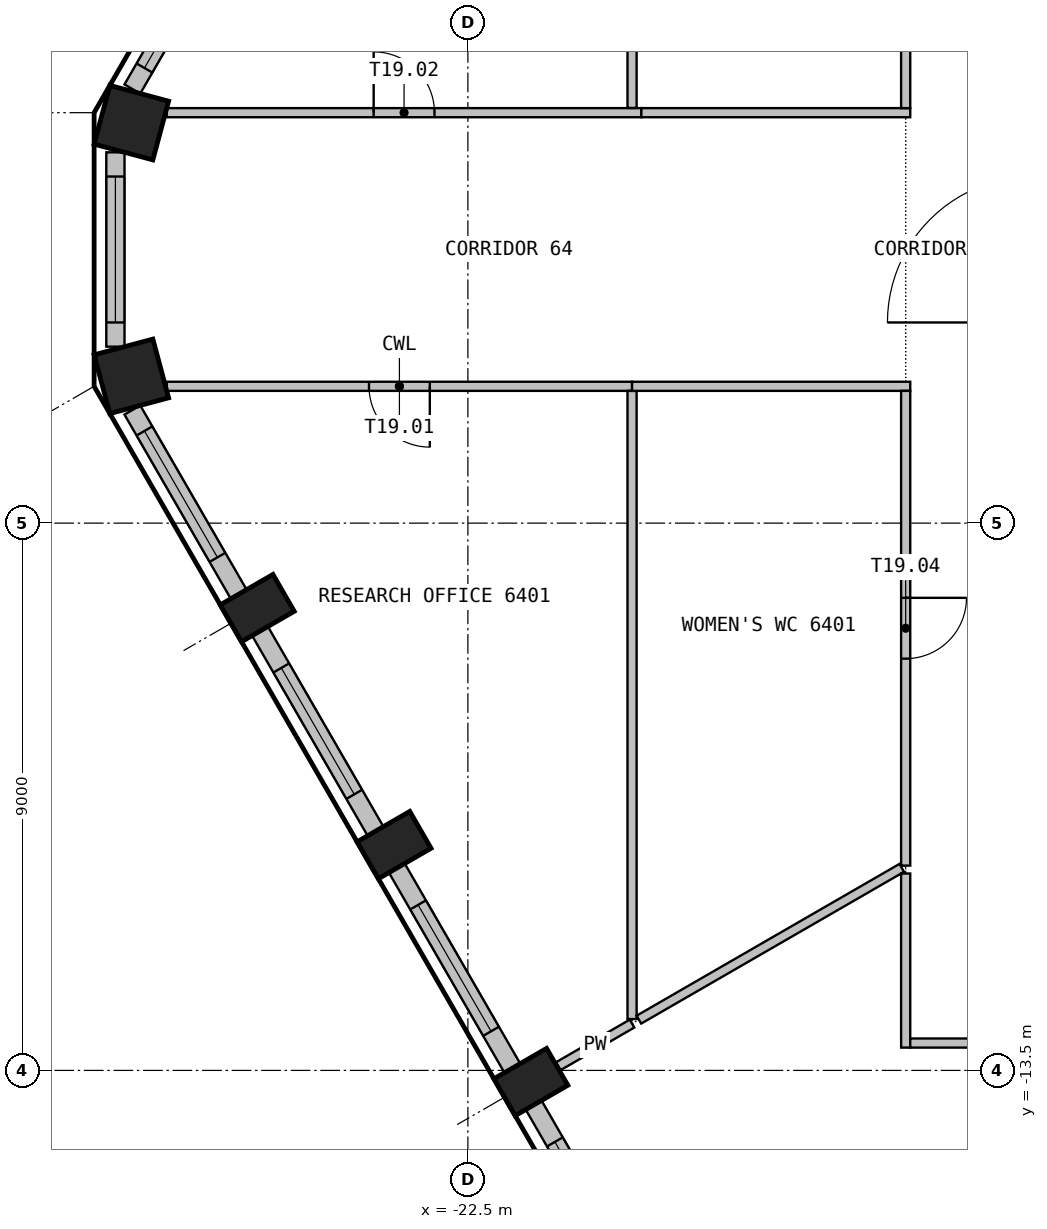
"""IFC4 building model, lengths in metres.
Left out: names, types, materials, properties, quantities, classifications, styles, units other than length and angle.
Written with IfcOpenShell. Run it as: python <this file> out.ifc"""

import sys

from ifc_helpers import new_model, si_unit, direction, frame, frame_2d, origin, origin_2d, place, context, subcontext, project, spatial, rectangle, extrude, element, fill, save


model = new_model("IFC4")
c1 = context("Model", 3, precision=1e-05, world=origin(), true_north=direction((0.0, 1.0)))
c2 = subcontext(c1, "Body", "Model", "MODEL_VIEW")
j1 = project(units=[si_unit("LENGTHUNIT", "METRE"), si_unit("PLANEANGLEUNIT", "RADIAN")], contexts=[c1])
p1 = place(None, origin())
s1 = spatial("IfcSite", under=j1, at=p1, CompositionType="ELEMENT")
p2 = place(p1, origin())
s2 = spatial("IfcBuilding", under=s1, at=p2, CompositionType="ELEMENT")
p3 = place(p2, frame((0.0, 0.0, 258.6)))
s3 = spatial("IfcBuildingStorey", under=s2, at=p3, CompositionType="ELEMENT", Elevation=258.6)
for number, where, z_axis, x_axis in (
    (1, (-28.035, 2.086, 0.0), (0.0, 0.0, 1.0), (-0.259, -0.966, 0.0)),
    (2, (-28.035, -2.086, 0.0), (0.0, 0.0, 1.0), (0.259, -0.966, 0.0)),
):
    element("IfcColumn", number, at=place(p3, frame(where, z_axis=z_axis, x_axis=x_axis)), inside=s3, PredefinedType="COLUMN", context=c2, shape_type="SweptSolid", body=[
        extrude(rectangle(XDim=1.0, YDim=1.0, at=origin_2d()), origin(), (0.0, 0.0, 1.0), 3.575),
    ])
for number, where, z_axis, x_axis in (
    (3, (-25.964, -5.897, 0.0), (0.0, 0.0, 1.0), (0.5, -0.866, 0.0)),
    (4, (-23.714, -9.794, 0.0), (0.0, 0.0, 1.0), (0.5, -0.866, 0.0)),
    (5, (-21.464, -13.691, 0.0), (0.0, 0.0, 1.0), (0.5, -0.866, 0.0)),
):
    element("IfcColumn", number, at=place(p3, frame(where, z_axis=z_axis, x_axis=x_axis)), inside=s3, PredefinedType="COLUMN", context=c2, shape_type="SweptSolid", body=[
        extrude(rectangle(XDim=0.7, YDim=1.0, at=origin_2d()), origin(), (0.0, 0.0, 1.0), 3.575),
    ])
p4 = place(p3, frame((-26.269, 5.669, 0.0), z_axis=(0.0, 0.0, 1.0), x_axis=(-0.499990325971, -0.866030989016, 0.0)))
e6 = element("IfcWall", 6, at=p4, inside=s3, PredefinedType="SOLIDWALL", context=c2, shape_type="SweptSolid", body=[
    extrude(rectangle(XDim=3.498, YDim=0.3, at=frame_2d((1.749, 0.0))), origin(), (0.0, 0.0, 1.0), 3.575),
])
p5 = place(p4, frame((0.699, 0.0, 0.9)))
e7 = element("IfcOpeningElement", 7, at=p5, cuts=e6, PredefinedType="OPENING", context=c2, shape_type="SweptSolid", body=[
    extrude(rectangle(XDim=2.4, YDim=2.1, at=frame_2d((1.2, 1.05))), frame((0.0, 0.16, 0.0), z_axis=(0.0, -1.0, 0.0), x_axis=(1.0, 0.0, 0.0)), (0.0, 0.0, 1.0), 0.32),
])
p6 = place(p3, frame((-28.297, 1.598, 0.0), z_axis=(0.0, 0.0, 1.0), x_axis=(0.0, -1.0, 0.0)))
e8 = element("IfcWall", 8, at=p6, inside=s3, PredefinedType="SOLIDWALL", context=c2, shape_type="SweptSolid", body=[
    extrude(rectangle(XDim=3.196, YDim=0.3, at=frame_2d((1.598, 0.0))), origin(), (0.0, 0.0, 1.0), 3.575),
])
p7 = place(p6, frame((0.398, 0.0, 0.9)))
e9 = element("IfcOpeningElement", 9, at=p7, cuts=e8, PredefinedType="OPENING", context=c2, shape_type="SweptSolid", body=[
    extrude(rectangle(XDim=2.4, YDim=2.1, at=frame_2d((1.2, 1.05))), frame((0.0, 0.16, 0.0), z_axis=(0.0, -1.0, 0.0), x_axis=(1.0, 0.0, 0.0)), (0.0, 0.0, 1.0), 0.32),
])
p8 = place(p3, frame((-28.018, -2.64, 0.0), z_axis=(0.0, 0.0, 1.0), x_axis=(0.499990325971, -0.866030989016, 0.0)))
e10 = element("IfcWall", 10, at=p8, inside=s3, PredefinedType="SOLIDWALL", context=c2, shape_type="SweptSolid", body=[
    extrude(rectangle(XDim=3.498, YDim=0.3, at=frame_2d((1.749, 0.0))), origin(), (0.0, 0.0, 1.0), 3.575),
])
p9 = place(p8, frame((0.398, 0.0, 0.9)))
e11 = element("IfcOpeningElement", 11, at=p9, cuts=e10, PredefinedType="OPENING", context=c2, shape_type="SweptSolid", body=[
    extrude(rectangle(XDim=2.4, YDim=2.1, at=frame_2d((1.2, 1.05))), frame((0.0, 0.16, 0.0), z_axis=(0.0, -1.0, 0.0), x_axis=(1.0, 0.0, 0.0)), (0.0, 0.0, 1.0), 0.32),
])
p10 = place(p3, frame((-25.919, -6.276, 0.0), z_axis=(0.0, 0.0, 1.0), x_axis=(0.499982058975, -0.866035761792, 0.0)))
e12 = element("IfcWall", 12, at=p10, inside=s3, PredefinedType="SOLIDWALL", context=c2, shape_type="SweptSolid", body=[
    extrude(rectangle(XDim=3.799, YDim=0.3, at=frame_2d((1.899, 0.0))), origin(), (0.0, 0.0, 1.0), 3.575),
])
p11 = place(p10, frame((0.699, 0.0, 0.9)))
e13 = element("IfcOpeningElement", 13, at=p11, cuts=e12, PredefinedType="OPENING", context=c2, shape_type="SweptSolid", body=[
    extrude(rectangle(XDim=2.4, YDim=2.1, at=frame_2d((1.2, 1.05))), frame((0.0, 0.16, 0.0), z_axis=(0.0, -1.0, 0.0), x_axis=(1.0, 0.0, 0.0)), (0.0, 0.0, 1.0), 0.32),
])
p12 = place(p3, frame((-23.669, -10.173, 0.0), z_axis=(0.0, 0.0, 1.0), x_axis=(0.499982058975, -0.866035761792, 0.0)))
e14 = element("IfcWall", 14, at=p12, inside=s3, PredefinedType="SOLIDWALL", context=c2, shape_type="SweptSolid", body=[
    extrude(rectangle(XDim=3.799, YDim=0.3, at=frame_2d((1.899, 0.0))), origin(), (0.0, 0.0, 1.0), 3.575),
])
p13 = place(p12, frame((0.699, 0.0, 0.9)))
e15 = element("IfcOpeningElement", 15, at=p13, cuts=e14, PredefinedType="OPENING", context=c2, shape_type="SweptSolid", body=[
    extrude(rectangle(XDim=2.4, YDim=2.1, at=frame_2d((1.2, 1.05))), frame((0.0, 0.16, 0.0), z_axis=(0.0, -1.0, 0.0), x_axis=(1.0, 0.0, 0.0)), (0.0, 0.0, 1.0), 0.32),
])
p14 = place(p3, frame((-21.419, -14.07, 0.0), z_axis=(0.0, 0.0, 1.0), x_axis=(0.499960102815, -0.866048437209, 0.0)))
e16 = element("IfcWall", 16, at=p14, inside=s3, PredefinedType="SOLIDWALL", context=c2, shape_type="SweptSolid", body=[
    extrude(rectangle(XDim=3.498, YDim=0.3, at=frame_2d((1.749, 0.0))), origin(), (0.0, 0.0, 1.0), 3.575),
])
p15 = place(p14, frame((0.699, 0.0, 0.9)))
e17 = element("IfcOpeningElement", 17, at=p15, cuts=e16, PredefinedType="OPENING", context=c2, shape_type="SweptSolid", body=[
    extrude(rectangle(XDim=2.4, YDim=2.1, at=frame_2d((1.2, 1.05))), frame((0.0, 0.16, 0.0), z_axis=(0.0, -1.0, 0.0), x_axis=(1.0, 0.0, 0.0)), (0.0, 0.0, 1.0), 0.32),
])
p16 = place(p3, frame((-19.8, -2.25, 0.0), z_axis=(0.0, 0.0, 1.0), x_axis=(-1.0, 0.0, 0.0)))
e18 = element("IfcWall", 18, at=p16, inside=s3, PredefinedType="PARTITIONING", context=c2, shape_type="SweptSolid", body=[
    extrude(rectangle(XDim=7.652, YDim=0.15, at=frame_2d((3.826, 0.0))), origin(), (0.0, 0.0, 1.0), 3.575),
])
p17 = place(p16, frame((3.326, 0.0, 0.0)))
e19 = element("IfcOpeningElement", 19, at=p17, cuts=e18, PredefinedType="OPENING", context=c2, shape_type="SweptSolid", body=[
    extrude(rectangle(XDim=1.0, YDim=2.1, at=frame_2d((0.5, 1.05))), frame((0.0, 0.085, 0.0), z_axis=(0.0, -1.0, 0.0), x_axis=(1.0, 0.0, 0.0)), (0.0, 0.0, 1.0), 0.17),
])
p18 = place(p3, frame((-27.452, 2.25, 0.0), z_axis=(0.0, 0.0, 1.0), x_axis=(1.0, 0.0, 0.0)))
e20 = element("IfcWall", 20, at=p18, inside=s3, PredefinedType="PARTITIONING", context=c2, shape_type="SweptSolid", body=[
    extrude(rectangle(XDim=7.805, YDim=0.15, at=frame_2d((3.903, 0.0))), origin(), (0.0, 0.0, 1.0), 3.575),
])
p19 = place(p18, frame((3.403, 0.0, 0.0)))
e21 = element("IfcOpeningElement", 21, at=p19, cuts=e20, PredefinedType="OPENING", context=c2, shape_type="SweptSolid", body=[
    extrude(rectangle(XDim=1.0, YDim=2.1, at=frame_2d((0.5, 1.05))), frame((0.0, 0.085, 0.0), z_axis=(0.0, -1.0, 0.0), x_axis=(1.0, 0.0, 0.0)), (0.0, 0.0, 1.0), 0.17),
])
p20 = place(p3, frame((-19.8, -12.73, 0.0), z_axis=(0.0, 0.0, 1.0), x_axis=(-0.865918715181, -0.500184744569, 0.0)))
e22 = element("IfcWall", 22, at=p20, inside=s3, PredefinedType="PARTITIONING", context=c2, shape_type="SweptSolid", body=[
    extrude(rectangle(XDim=1.402, YDim=0.15, at=frame_2d((0.701, 0.0))), origin(), (0.0, 0.0, 1.0), 3.575),
])
p21 = place(p3, frame((-19.8, -2.325, 0.0), z_axis=(0.0, 0.0, 1.0), x_axis=(0.0, -1.0, 0.0)))
e23 = element("IfcWall", 23, at=p21, inside=s3, PredefinedType="PARTITIONING", context=c2, shape_type="SweptSolid", body=[
    extrude(rectangle(XDim=10.33, YDim=0.15, at=frame_2d((5.165, 0.0))), origin(), (0.0, 0.0, 1.0), 3.575),
])
p22 = place(p3, frame((-15.365, -10.169, 0.0), z_axis=(0.0, 0.0, 1.0), x_axis=(-0.866025118187, -0.500000494669, 0.0)))
e24 = element("IfcWall", 24, at=p22, inside=s3, PredefinedType="PARTITIONING", context=c2, shape_type="SweptSolid", body=[
    extrude(rectangle(XDim=4.991, YDim=0.15, at=frame_2d((2.496, 0.0))), origin(), (0.0, 0.0, 1.0), 3.575),
])
p23 = place(p3, frame((-15.225, -2.25, 0.0), z_axis=(0.0, 0.0, 1.0), x_axis=(-1.0, 0.0, 0.0)))
e25 = element("IfcWall", 25, at=p23, inside=s3, PredefinedType="PARTITIONING", context=c2, shape_type="SweptSolid", body=[
    extrude(rectangle(XDim=4.575, YDim=0.15, at=frame_2d((2.288, 0.0))), origin(), (0.0, 0.0, 1.0), 3.575),
])
p24 = place(p3, frame((-19.8, 9.543, 0.0), z_axis=(0.0, 0.0, 1.0), x_axis=(0.0, -1.0, 0.0)))
e26 = element("IfcWall", 26, at=p24, inside=s3, PredefinedType="PARTITIONING", context=c2, shape_type="SweptSolid", body=[
    extrude(rectangle(XDim=7.215, YDim=0.15, at=frame_2d((3.607, 0.0))), origin(), (0.0, 0.0, 1.0), 3.575),
])
p25 = place(p3, frame((-19.647, 2.25, 0.0), z_axis=(0.0, 0.0, 1.0), x_axis=(1.0, 0.0, 0.0)))
e27 = element("IfcWall", 27, at=p25, inside=s3, PredefinedType="PARTITIONING", context=c2, shape_type="SweptSolid", body=[
    extrude(rectangle(XDim=4.422, YDim=0.15, at=frame_2d((2.211, 0.0))), origin(), (0.0, 0.0, 1.0), 3.575),
])
p26 = place(p3, frame((-15.3, -10.262, 0.0), z_axis=(0.0, 0.0, 1.0), x_axis=(0.0, -1.0, 0.0)))
e28 = element("IfcWall", 28, at=p26, inside=s3, PredefinedType="PARTITIONING", context=c2, shape_type="SweptSolid", body=[
    extrude(rectangle(XDim=2.863, YDim=0.15, at=frame_2d((1.432, 0.0))), origin(), (0.0, 0.0, 1.0), 3.575),
])
p27 = place(p3, frame((-15.225, -13.05, 0.0), z_axis=(0.0, 0.0, 1.0), x_axis=(1.0, 0.0, 0.0)))
e29 = element("IfcWall", 29, at=p27, inside=s3, PredefinedType="PARTITIONING", context=c2, shape_type="SweptSolid", body=[
    extrude(rectangle(XDim=3.975, YDim=0.15, at=frame_2d((1.988, 0.0))), origin(), (0.0, 0.0, 1.0), 3.575),
])
p28 = place(p27, frame((1.488, 0.0, 0.0)))
e30 = element("IfcOpeningElement", 30, at=p28, cuts=e29, PredefinedType="OPENING", context=c2, shape_type="SweptSolid", body=[
    extrude(rectangle(XDim=1.0, YDim=2.1, at=frame_2d((0.5, 1.05))), frame((0.0, 0.085, 0.0), z_axis=(0.0, -1.0, 0.0), x_axis=(1.0, 0.0, 0.0)), (0.0, 0.0, 1.0), 0.17),
])
p29 = place(p3, frame((-15.3, -2.325, 0.0), z_axis=(0.0, 0.0, 1.0), x_axis=(0.0, -1.0, 0.0)))
e31 = element("IfcWall", 31, at=p29, inside=s3, PredefinedType="PARTITIONING", context=c2, shape_type="SweptSolid", body=[
    extrude(rectangle(XDim=7.807, YDim=0.15, at=frame_2d((3.904, 0.0))), origin(), (0.0, 0.0, 1.0), 3.575),
])
p30 = place(p29, frame((3.404, 0.0, 0.0)))
e32 = element("IfcOpeningElement", 32, at=p30, cuts=e31, PredefinedType="OPENING", context=c2, shape_type="SweptSolid", body=[
    extrude(rectangle(XDim=1.0, YDim=2.1, at=frame_2d((0.5, 1.05))), frame((0.0, 0.085, 0.0), z_axis=(0.0, -1.0, 0.0), x_axis=(1.0, 0.0, 0.0)), (0.0, 0.0, 1.0), 0.17),
])
p31 = place(p3, frame((-15.3, 7.044, 0.0), z_axis=(0.0, 0.0, 1.0), x_axis=(0.0, -1.0, 0.0)))
e33 = element("IfcWall", 33, at=p31, inside=s3, PredefinedType="PARTITIONING", context=c2, shape_type="SweptSolid", body=[
    extrude(rectangle(XDim=4.719, YDim=0.15, at=frame_2d((2.359, 0.0))), origin(), (0.0, 0.0, 1.0), 3.575),
])
p32 = place(p31, frame((1.86, 0.0, 0.0)))
e34 = element("IfcOpeningElement", 34, at=p32, cuts=e33, PredefinedType="OPENING", context=c2, shape_type="SweptSolid", body=[
    extrude(rectangle(XDim=1.0, YDim=2.1, at=frame_2d((0.5, 1.05))), frame((0.0, 0.085, 0.0), z_axis=(0.0, -1.0, 0.0), x_axis=(1.0, 0.0, 0.0)), (0.0, 0.0, 1.0), 0.17),
])
p33 = place(p5, origin())
e35 = element("IfcWindow", 35, at=p33, inside=s3, PartitioningType="SINGLE_PANEL", PredefinedType="WINDOW", context=c2, shape_type="SweptSolid", body=[
    extrude(rectangle(XDim=2.4, YDim=2.1, at=frame_2d((1.2, 1.05))), frame((0.0, 0.03, 0.0), z_axis=(0.0, -1.0, 0.0), x_axis=(1.0, 0.0, 0.0)), (0.0, 0.0, 1.0), 0.06),
])
fill(e7, e35)
p34 = place(p7, origin())
e36 = element("IfcWindow", 36, at=p34, inside=s3, PartitioningType="SINGLE_PANEL", PredefinedType="WINDOW", context=c2, shape_type="SweptSolid", body=[
    extrude(rectangle(XDim=2.4, YDim=2.1, at=frame_2d((1.2, 1.05))), frame((0.0, 0.03, 0.0), z_axis=(0.0, -1.0, 0.0), x_axis=(1.0, 0.0, 0.0)), (0.0, 0.0, 1.0), 0.06),
])
fill(e9, e36)
p35 = place(p9, origin())
e37 = element("IfcWindow", 37, at=p35, inside=s3, PartitioningType="SINGLE_PANEL", PredefinedType="WINDOW", context=c2, shape_type="SweptSolid", body=[
    extrude(rectangle(XDim=2.4, YDim=2.1, at=frame_2d((1.2, 1.05))), frame((0.0, 0.03, 0.0), z_axis=(0.0, -1.0, 0.0), x_axis=(1.0, 0.0, 0.0)), (0.0, 0.0, 1.0), 0.06),
])
fill(e11, e37)
p36 = place(p11, origin())
e38 = element("IfcWindow", 38, at=p36, inside=s3, PartitioningType="SINGLE_PANEL", PredefinedType="WINDOW", context=c2, shape_type="SweptSolid", body=[
    extrude(rectangle(XDim=2.4, YDim=2.1, at=frame_2d((1.2, 1.05))), frame((0.0, 0.03, 0.0), z_axis=(0.0, -1.0, 0.0), x_axis=(1.0, 0.0, 0.0)), (0.0, 0.0, 1.0), 0.06),
])
fill(e13, e38)
p37 = place(p13, origin())
e39 = element("IfcWindow", 39, at=p37, inside=s3, PartitioningType="SINGLE_PANEL", PredefinedType="WINDOW", context=c2, shape_type="SweptSolid", body=[
    extrude(rectangle(XDim=2.4, YDim=2.1, at=frame_2d((1.2, 1.05))), frame((0.0, 0.03, 0.0), z_axis=(0.0, -1.0, 0.0), x_axis=(1.0, 0.0, 0.0)), (0.0, 0.0, 1.0), 0.06),
])
fill(e15, e39)
p38 = place(p15, origin())
e40 = element("IfcWindow", 40, at=p38, inside=s3, PartitioningType="SINGLE_PANEL", PredefinedType="WINDOW", context=c2, shape_type="SweptSolid", body=[
    extrude(rectangle(XDim=2.4, YDim=2.1, at=frame_2d((1.2, 1.05))), frame((0.0, 0.03, 0.0), z_axis=(0.0, -1.0, 0.0), x_axis=(1.0, 0.0, 0.0)), (0.0, 0.0, 1.0), 0.06),
])
fill(e17, e40)
p39 = place(p17, origin())
e41 = element("IfcDoor", 41, at=p39, inside=s3, OperationType="SINGLE_SWING_RIGHT", PredefinedType="DOOR", context=c2, shape_type="SweptSolid", body=[
    extrude(rectangle(XDim=1.0, YDim=2.1, at=frame_2d((0.5, 1.05))), frame((0.0, 0.025, 0.0), z_axis=(0.0, -1.0, 0.0), x_axis=(1.0, 0.0, 0.0)), (0.0, 0.0, 1.0), 0.05),
])
fill(e19, e41)
p40 = place(p19, origin())
e42 = element("IfcDoor", 42, at=p40, inside=s3, OperationType="SINGLE_SWING_RIGHT", PredefinedType="DOOR", context=c2, shape_type="SweptSolid", body=[
    extrude(rectangle(XDim=1.0, YDim=2.1, at=frame_2d((0.5, 1.05))), frame((0.0, 0.025, 0.0), z_axis=(0.0, -1.0, 0.0), x_axis=(1.0, 0.0, 0.0)), (0.0, 0.0, 1.0), 0.05),
])
fill(e21, e42)
p41 = place(p30, origin())
e43 = element("IfcDoor", 43, at=p41, inside=s3, OperationType="SINGLE_SWING_RIGHT", PredefinedType="DOOR", context=c2, shape_type="SweptSolid", body=[
    extrude(rectangle(XDim=1.0, YDim=2.1, at=frame_2d((0.5, 1.05))), frame((0.0, 0.025, 0.0), z_axis=(0.0, -1.0, 0.0), x_axis=(1.0, 0.0, 0.0)), (0.0, 0.0, 1.0), 0.05),
])
fill(e32, e43)
save(model, sys.argv[1])
